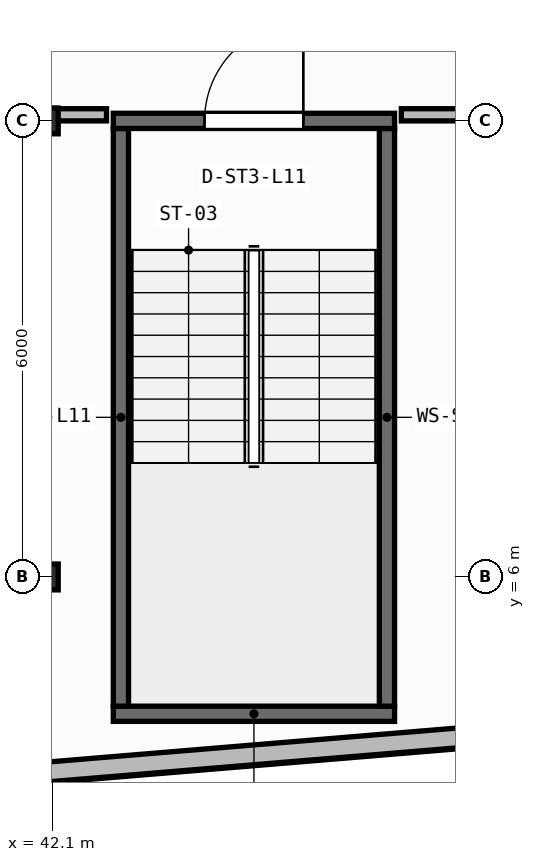
"""IFC4 building model, lengths in metres.
Left out: names, types, materials, properties, quantities, classifications, styles, units other than length and angle.
Written with IfcOpenShell. Run it as: python <this file> out.ifc"""

import sys

from ifc_helpers import new_model, si_unit, direction, frame, frame_2d, origin, origin_2d, place, context, subcontext, project, spatial, rectangle, i_section, extrude, element, fill, save


model = new_model("IFC4")
c1 = context("Model", 3, precision=1e-05, world=origin(), true_north=direction((0.0, 1.0)))
c2 = subcontext(c1, "Body", "Model", "MODEL_VIEW")
j1 = project(units=[si_unit("LENGTHUNIT", "METRE"), si_unit("PLANEANGLEUNIT", "RADIAN")], contexts=[c1])
p1 = place(None, origin())
s1 = spatial("IfcSite", under=j1, at=p1, CompositionType="ELEMENT")
p2 = place(p1, origin())
s2 = spatial("IfcBuilding", under=s1, at=p2, CompositionType="ELEMENT")
p3 = place(p2, frame((0.0, 0.0, 46.2)))
s3 = spatial("IfcBuildingStorey", under=s2, at=p3, CompositionType="ELEMENT", Elevation=46.2)
for number, where, z_axis, x_axis in (
    (1, (42.0, 6.0, 0.0), (0.0, 0.0, 1.0), (1.0, 0.0, 0.0)),
    (2, (42.0, 12.0, 0.0), (0.0, 0.0, 1.0), (1.0, 0.0, 0.0)),
):
    element("IfcColumn", number, at=place(p3, frame(where, z_axis=z_axis, x_axis=x_axis)), inside=s3, PredefinedType="COLUMN", context=c2, shape_type="SweptSolid", body=[
        extrude(i_section(OverallWidth=0.35, OverallDepth=0.34, WebThickness=0.016, FlangeThickness=0.028, at=origin_2d()), origin(), (0.0, 0.0, 1.0), 3.95),
    ])
p4 = place(p3, frame((2.76, 0.174, 0.0), z_axis=(0.0, 0.0, 1.0), x_axis=(0.996571478456, 0.082736257641, 0.0)))
e3 = element("IfcWall", 3, at=p4, inside=s3, PredefinedType="STANDARD", context=c2, shape_type="SweptSolid", body=[
    extrude(rectangle(XDim=52.861, YDim=0.26, at=frame_2d((26.431, 0.0))), origin(), (0.0, 0.0, 1.0), 3.71),
])
p5 = place(p4, frame((25.231, 0.0, 0.9)))
e4 = element("IfcOpeningElement", 4, at=p5, cuts=e3, PredefinedType="OPENING", context=c2, shape_type="SweptSolid", body=[
    extrude(rectangle(XDim=2.4, YDim=1.65, at=frame_2d((1.2, 0.825))), frame((0.0, 0.14, 0.0), z_axis=(0.0, -1.0, 0.0), x_axis=(1.0, 0.0, 0.0)), (0.0, 0.0, 1.0), 0.28),
])
p6 = place(p3, frame((42.9, 4.2, 0.0), z_axis=(0.0, 0.0, 1.0), x_axis=(1.0, 0.0, 0.0)))
e5 = element("IfcWall", 5, at=p6, inside=s3, PredefinedType="SHEAR", context=c2, shape_type="SweptSolid", body=[
    extrude(rectangle(XDim=3.7, YDim=0.2, at=frame_2d((1.85, 0.0))), origin(), (0.0, 0.0, 1.0), 3.71),
])
for number, where, z_axis, x_axis in (
    (6, (43.0, 4.3, 0.0), (0.0, 0.0, 1.0), (0.0, 1.0, 0.0)),
    (7, (46.5, 4.3, 0.0), (0.0, 0.0, 1.0), (0.0, 1.0, 0.0)),
):
    element("IfcWall", number, at=place(p3, frame(where, z_axis=z_axis, x_axis=x_axis)), inside=s3, PredefinedType="SHEAR", context=c2, shape_type="SweptSolid", body=[
        extrude(rectangle(XDim=7.6, YDim=0.2, at=frame_2d((3.8, 0.0))), origin(), (0.0, 0.0, 1.0), 3.71),
    ])
p7 = place(p3, frame((42.9, 12.0, 0.0), z_axis=(0.0, 0.0, 1.0), x_axis=(1.0, 0.0, 0.0)))
e8 = element("IfcWall", 8, at=p7, inside=s3, PredefinedType="SHEAR", context=c2, shape_type="SweptSolid", body=[
    extrude(rectangle(XDim=3.7, YDim=0.2, at=frame_2d((1.85, 0.0))), origin(), (0.0, 0.0, 1.0), 3.71),
])
p8 = place(p7, frame((1.2, 0.0, 0.0)))
e9 = element("IfcOpeningElement", 9, at=p8, cuts=e8, PredefinedType="OPENING", context=c2, shape_type="SweptSolid", body=[
    extrude(rectangle(XDim=1.3, YDim=2.15, at=frame_2d((0.65, 1.075))), frame((0.0, 0.11, 0.0), z_axis=(0.0, -1.0, 0.0), x_axis=(1.0, 0.0, 0.0)), (0.0, 0.0, 1.0), 0.22),
])
p9 = place(p3, frame((31.63, 12.08, 0.0), z_axis=(0.0, 0.0, 1.0), x_axis=(1.0, 0.0, 0.0)))
e10 = element("IfcWall", 10, at=p9, inside=s3, PredefinedType="PARTITIONING", context=c2, shape_type="SweptSolid", body=[
    extrude(rectangle(XDim=11.181, YDim=0.16, at=frame_2d((5.59, 0.0))), origin(), (0.0, 0.0, 1.0), 3.073),
])
p10 = place(p3, frame((46.689, 12.08, 0.0), z_axis=(0.0, 0.0, 1.0), x_axis=(1.0, 0.0, 0.0)))
e11 = element("IfcWall", 11, at=p10, inside=s3, PredefinedType="PARTITIONING", context=c2, shape_type="SweptSolid", body=[
    extrude(rectangle(XDim=3.011, YDim=0.16, at=frame_2d((1.505, 0.0))), origin(), (0.0, 0.0, 1.0), 3.073),
])
p11 = place(p8, origin())
e12 = element("IfcDoor", 12, at=p11, inside=s3, OperationType="SINGLE_SWING_RIGHT", PredefinedType="DOOR", context=c2, shape_type="SweptSolid", body=[
    extrude(rectangle(XDim=1.3, YDim=2.15, at=frame_2d((0.65, 1.075))), frame((0.0, 0.025, 0.0), z_axis=(0.0, -1.0, 0.0), x_axis=(1.0, 0.0, 0.0)), (0.0, 0.0, 1.0), 0.05),
])
fill(e9, e12)
save(model, sys.argv[1])
